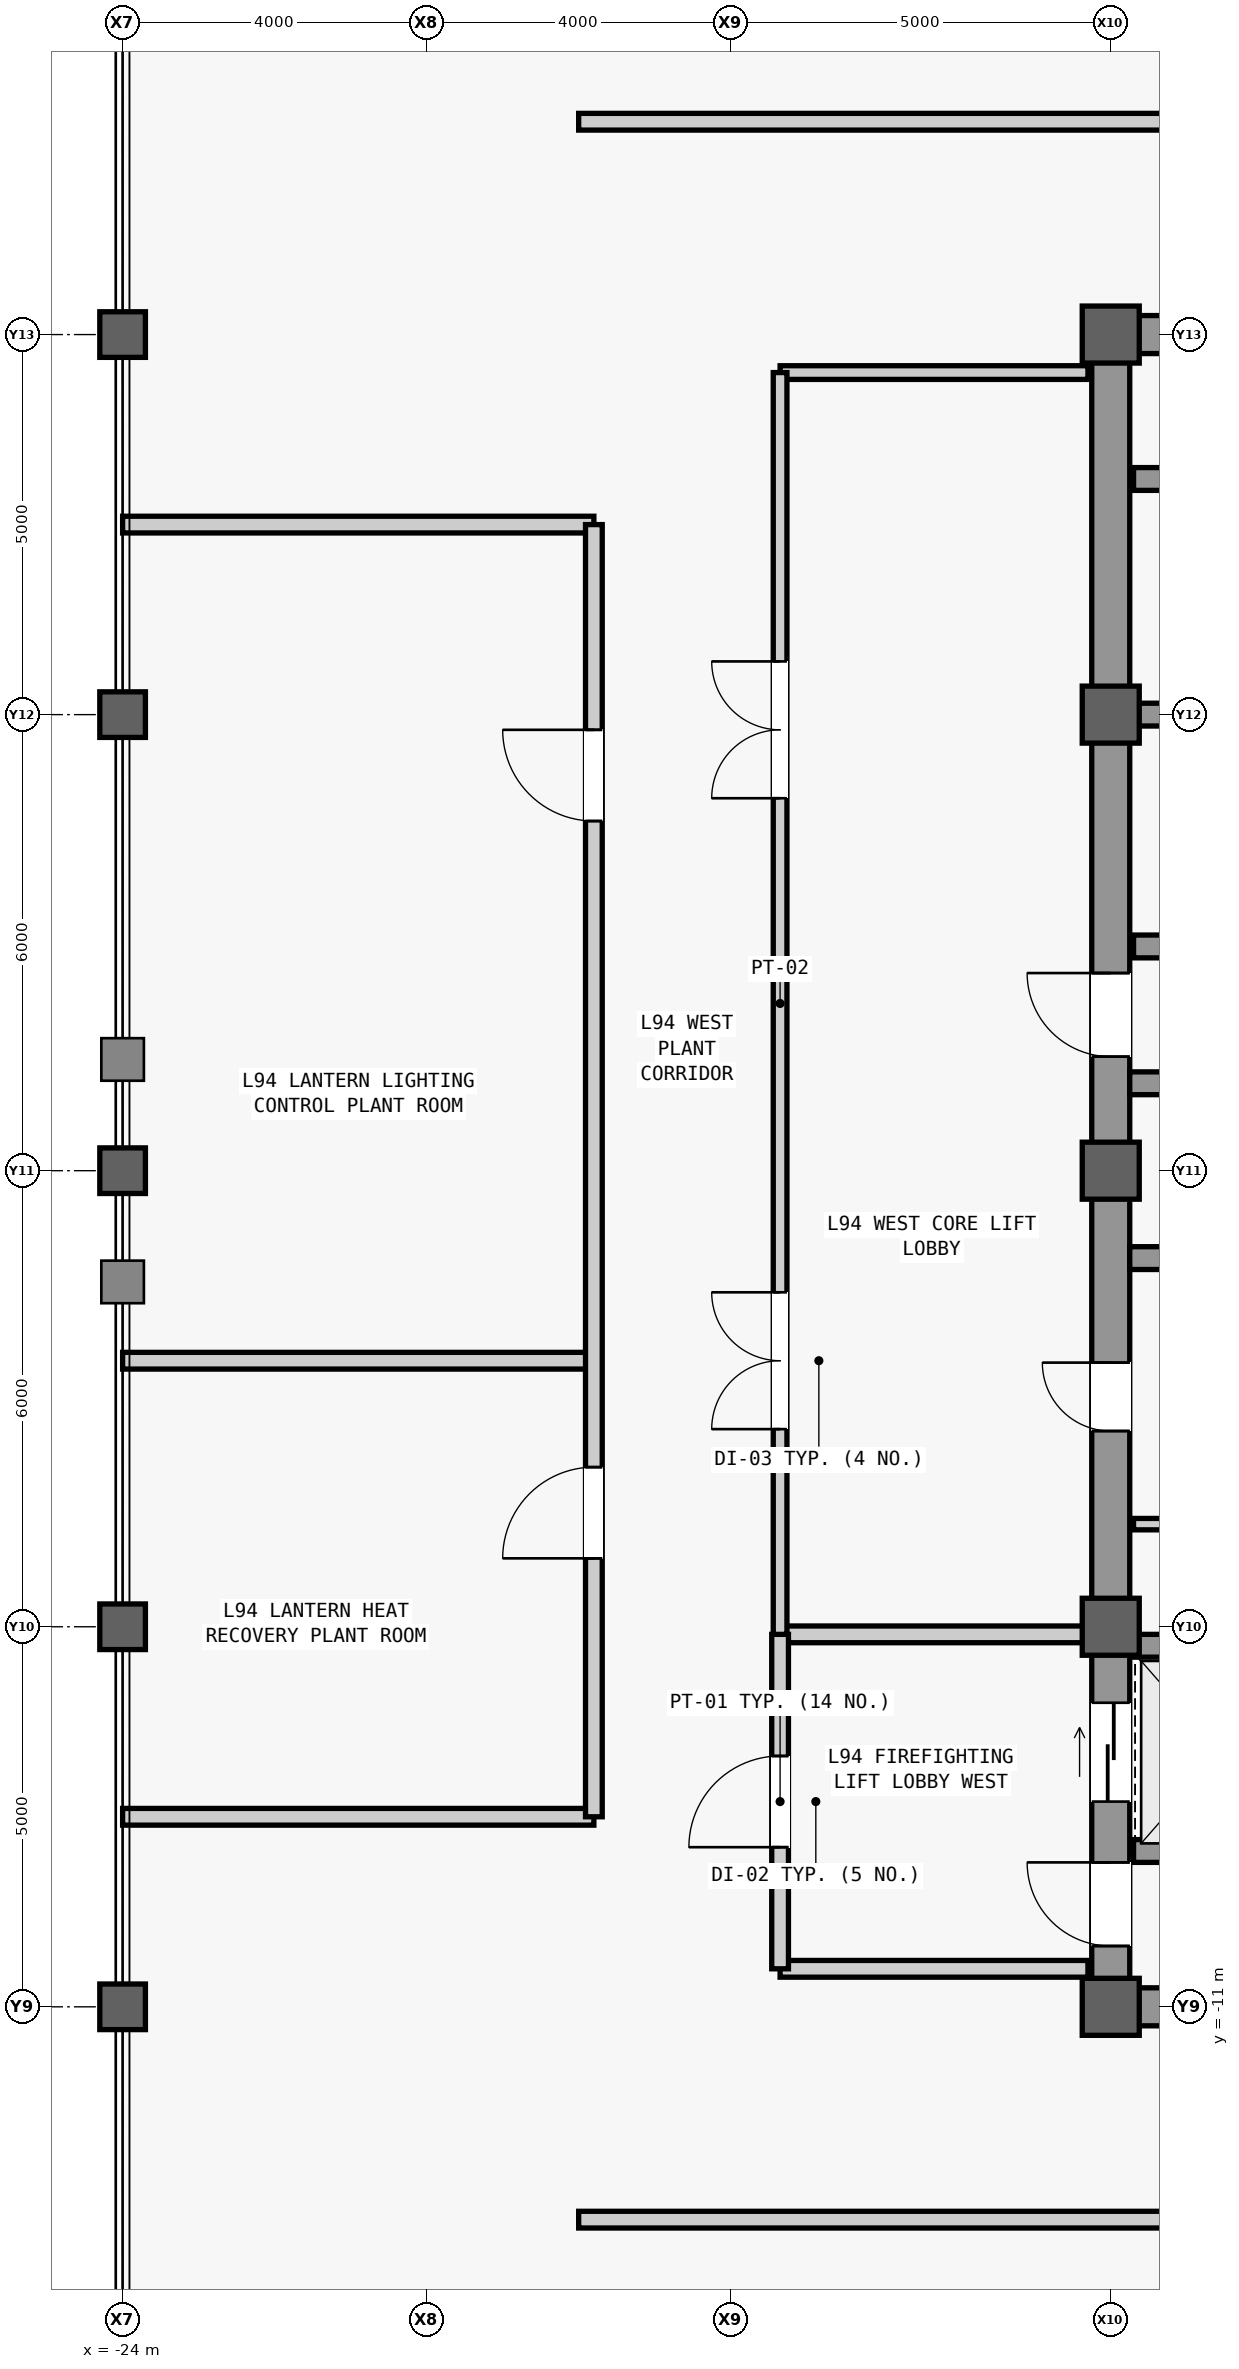
"""IFC4 building model, lengths in metres.
Left out: names, types, materials, properties, quantities, classifications, styles, units other than length and angle.
Written with IfcOpenShell. Run it as: python <this file> out.ifc"""

import sys

from ifc_helpers import new_model, si_unit, direction, frame, frame_2d, origin, origin_2d, place, context, subcontext, project, spatial, rectangle, hollow_rectangle, extrude, source, transform, mapped, element, fill, save


model = new_model("IFC4")
c1 = context("Model", 3, precision=1e-05, world=origin(), true_north=direction((0.0, 1.0)))
c2 = subcontext(c1, "Body", "Model", "MODEL_VIEW")
j1 = project(units=[si_unit("LENGTHUNIT", "METRE"), si_unit("PLANEANGLEUNIT", "RADIAN")], contexts=[c1])
p1 = place(None, origin())
s1 = spatial("IfcSite", under=j1, at=p1, CompositionType="ELEMENT")
p2 = place(p1, origin())
s2 = spatial("IfcBuilding", under=s1, at=p2, CompositionType="ELEMENT")
p3 = place(p2, frame((0.0, 0.0, 399.5)))
s3 = spatial("IfcBuildingStorey", under=s2, at=p3, CompositionType="ELEMENT", Elevation=399.5)
m1 = source(origin(), c2, "Body", "SweptSolid", [
    extrude(rectangle(XDim=22.0, YDim=0.5, at=frame_2d((11.0, 0.0))), origin(), (0.0, 0.0, 1.0), 4.5),
])
p4 = place(p3, frame((-11.0, -11.0, 0.0), z_axis=(0.0, 0.0, 1.0), x_axis=(0.0, 1.0, 0.0)))
e1 = element("IfcWall", 1, at=p4, inside=s3, PredefinedType="SHEAR", context=c2, shape_type="MappedRepresentation", body=[
    mapped(m1, transform((0.0, 0.0, 0.0), scale=1.0)),
])
m2 = source(origin(), c2, "Body", "SweptSolid", [
    extrude(rectangle(XDim=1.1, YDim=2.2, at=frame_2d((0.55, 1.1))), frame((0.0, 0.26, 0.0), z_axis=(0.0, -1.0, 0.0), x_axis=(1.0, 0.0, 0.0)), (0.0, 0.0, 1.0), 0.52),
])
p5 = place(p4, frame((0.8, 0.0, 0.0)))
e2 = element("IfcOpeningElement", 2, at=p5, cuts=e1, PredefinedType="OPENING", context=c2, shape_type="MappedRepresentation", body=[
    mapped(m2, transform((0.0, 0.0, 0.0), scale=1.0)),
])
p6 = place(p4, frame((12.5, 0.0, 0.0)))
e3 = element("IfcOpeningElement", 3, at=p6, cuts=e1, PredefinedType="OPENING", context=c2, shape_type="MappedRepresentation", body=[
    mapped(m2, transform((0.0, 0.0, 0.0), scale=1.0)),
])
m3 = source(origin(), c2, "Body", "SweptSolid", [
    extrude(rectangle(XDim=0.9, YDim=2.15, at=frame_2d((0.45, 1.075))), frame((0.0, 0.26, 0.0), z_axis=(0.0, -1.0, 0.0), x_axis=(1.0, 0.0, 0.0)), (0.0, 0.0, 1.0), 0.52),
])
p7 = place(p4, frame((7.575, 0.0, 0.0)))
e4 = element("IfcOpeningElement", 4, at=p7, cuts=e1, PredefinedType="OPENING", context=c2, shape_type="MappedRepresentation", body=[
    mapped(m3, transform((0.0, 0.0, 0.0), scale=1.0)),
])
m4 = source(origin(), c2, "Body", "SweptSolid", [
    extrude(rectangle(XDim=1.3, YDim=2.3, at=frame_2d((0.65, 1.15))), frame((0.0, 0.26, 0.0), z_axis=(0.0, -1.0, 0.0), x_axis=(1.0, 0.0, 0.0)), (0.0, 0.0, 1.0), 0.52),
])
p8 = place(p4, frame((2.7, 0.0, 0.0)))
e5 = element("IfcOpeningElement", 5, at=p8, cuts=e1, PredefinedType="OPENING", context=c2, shape_type="MappedRepresentation", body=[
    mapped(m4, transform((0.0, 0.0, 0.0), scale=1.0)),
])
m5 = source(origin(), c2, "Body", "SweptSolid", [
    extrude(rectangle(XDim=5.9, YDim=0.5, at=frame_2d((2.95, 0.0))), origin(), (0.0, 0.0, 1.0), 4.5),
])
for number, where, z_axis, x_axis in (
    (6, (-10.75, -11.0, 0.0), (0.0, 0.0, 1.0), (1.0, 0.0, 0.0)),
    (7, (-10.75, 11.0, 0.0), (0.0, 0.0, 1.0), (1.0, 0.0, 0.0)),
):
    element("IfcWall", number, at=place(p3, frame(where, z_axis=z_axis, x_axis=x_axis)), inside=s3, PredefinedType="SHEAR", context=c2, shape_type="MappedRepresentation", body=[
        mapped(m5, transform((0.0, 0.0, 0.0), scale=1.0)),
    ])
m6 = source(origin(), c2, "Body", "SweptSolid", [
    extrude(rectangle(XDim=5.65, YDim=0.3, at=frame_2d((2.825, 0.0))), origin(), (0.0, 0.0, 1.0), 4.5),
])
for number, where, z_axis, x_axis in (
    (8, (-10.75, -1.15, 0.0), (0.0, 0.0, 1.0), (1.0, 0.0, 0.0)),
    (9, (-10.75, 1.15, 0.0), (0.0, 0.0, 1.0), (1.0, 0.0, 0.0)),
):
    element("IfcWall", number, at=place(p3, frame(where, z_axis=z_axis, x_axis=x_axis)), inside=s3, PredefinedType="SHEAR", context=c2, shape_type="MappedRepresentation", body=[
        mapped(m6, transform((0.0, 0.0, 0.0), scale=1.0)),
    ])
m7 = source(origin(), c2, "Body", "SweptSolid", [
    extrude(hollow_rectangle(XDim=0.6, YDim=0.6, WallThickness=0.035, at=origin_2d()), origin(), (0.0, 0.0, 1.0), 4.8),
])
for number, where, z_axis, x_axis in (
    (10, (-24.0, -11.0, 0.0), (0.0, 0.0, 1.0), (1.0, 0.0, 0.0)),
    (11, (-24.0, -6.0, 0.0), (0.0, 0.0, 1.0), (1.0, 0.0, 0.0)),
    (12, (-24.0, 0.0, 0.0), (0.0, 0.0, 1.0), (1.0, 0.0, 0.0)),
    (13, (-24.0, 6.0, 0.0), (0.0, 0.0, 1.0), (1.0, 0.0, 0.0)),
    (14, (-24.0, 11.0, 0.0), (0.0, 0.0, 1.0), (1.0, 0.0, 0.0)),
):
    element("IfcColumn", number, at=place(p3, frame(where, z_axis=z_axis, x_axis=x_axis)), inside=s3, PredefinedType="COLUMN", context=c2, shape_type="MappedRepresentation", body=[
        mapped(m7, transform((0.0, 0.0, 0.0), scale=1.0)),
    ])
m8 = source(origin(), c2, "Body", "SweptSolid", [
    extrude(rectangle(XDim=0.75, YDim=0.75, at=origin_2d()), origin(), (0.0, 0.0, 1.0), 4.8),
])
for number, where, z_axis, x_axis in (
    (15, (-11.0, -11.0, 0.0), (0.0, 0.0, 1.0), (1.0, 0.0, 0.0)),
    (16, (-11.0, -6.0, 0.0), (0.0, 0.0, 1.0), (1.0, 0.0, 0.0)),
    (17, (-11.0, 0.0, 0.0), (0.0, 0.0, 1.0), (1.0, 0.0, 0.0)),
    (18, (-11.0, 6.0, 0.0), (0.0, 0.0, 1.0), (1.0, 0.0, 0.0)),
    (19, (-11.0, 11.0, 0.0), (0.0, 0.0, 1.0), (1.0, 0.0, 0.0)),
):
    element("IfcColumn", number, at=place(p3, frame(where, z_axis=z_axis, x_axis=x_axis)), inside=s3, PredefinedType="COLUMN", context=c2, shape_type="MappedRepresentation", body=[
        mapped(m8, transform((0.0, 0.0, 0.0), scale=1.0)),
    ])
m9 = source(origin(), c2, "Body", "SweptSolid", [
    extrude(rectangle(XDim=2.2, YDim=0.3, at=frame_2d((1.1, 0.0))), origin(), (0.0, 0.0, 1.0), 4.5),
])
for number, where, z_axis, x_axis in (
    (20, (-10.7, -8.95, 0.0), (0.0, 0.0, 1.0), (1.0, 0.0, 0.0)),
    (21, (-10.7, -6.25, 0.0), (0.0, 0.0, 1.0), (1.0, 0.0, 0.0)),
    (22, (-10.7, 2.95, 0.0), (0.0, 0.0, 1.0), (1.0, 0.0, 0.0)),
    (23, (-10.7, 6.0, 0.0), (0.0, 0.0, 1.0), (1.0, 0.0, 0.0)),
    (24, (-10.7, 9.1, 0.0), (0.0, 0.0, 1.0), (1.0, 0.0, 0.0)),
):
    element("IfcWall", number, at=place(p3, frame(where, z_axis=z_axis, x_axis=x_axis)), inside=s3, PredefinedType="SHEAR", context=c2, shape_type="MappedRepresentation", body=[
        mapped(m9, transform((0.0, 0.0, 0.0), scale=1.0)),
    ])
m10 = source(origin(), c2, "Body", "SweptSolid", [
    extrude(rectangle(XDim=2.05, YDim=0.15, at=frame_2d((1.025, 0.0))), origin(), (0.0, 0.0, 1.0), 4.5),
])
p9 = place(p3, frame((-10.7, -4.65, 0.0), z_axis=(0.0, 0.0, 1.0), x_axis=(1.0, 0.0, 0.0)))
e25 = element("IfcWall", 25, at=p9, inside=s3, PredefinedType="PARTITIONING", context=c2, shape_type="MappedRepresentation", body=[
    mapped(m10, transform((0.0, 0.0, 0.0), scale=1.0)),
])
m11 = source(origin(), c2, "Body", "SweptSolid", [
    extrude(rectangle(XDim=4.05, YDim=0.22, at=frame_2d((2.025, 0.0))), origin(), (0.0, 0.0, 1.0), 4.5),
])
p10 = place(p3, frame((-15.35, -10.5, 0.0), z_axis=(0.0, 0.0, 1.0), x_axis=(1.0, 0.0, 0.0)))
e26 = element("IfcWall", 26, at=p10, inside=s3, PredefinedType="PARTITIONING", context=c2, shape_type="MappedRepresentation", body=[
    mapped(m11, transform((0.0, 0.0, 0.0), scale=1.0)),
])
m12 = source(origin(), c2, "Body", "SweptSolid", [
    extrude(rectangle(XDim=4.05, YDim=0.22, at=frame_2d((2.025, 0.0))), origin(), (0.0, 0.0, 1.0), 3.951),
])
p11 = place(p3, frame((-15.35, -6.1, 0.0), z_axis=(0.0, 0.0, 1.0), x_axis=(1.0, 0.0, 0.0)))
e27 = element("IfcWall", 27, at=p11, inside=s3, PredefinedType="PARTITIONING", context=c2, shape_type="MappedRepresentation", body=[
    mapped(m12, transform((0.0, 0.0, 0.0), scale=1.0)),
])
m13 = source(origin(), c2, "Body", "SweptSolid", [
    extrude(rectangle(XDim=4.4, YDim=0.22, at=frame_2d((2.2, 0.0))), origin(), (0.0, 0.0, 1.0), 4.5),
])
p12 = place(p3, frame((-15.35, -10.5, 0.0), z_axis=(0.0, 0.0, 1.0), x_axis=(0.0, 1.0, 0.0)))
e28 = element("IfcWall", 28, at=p12, inside=s3, PredefinedType="PARTITIONING", context=c2, shape_type="MappedRepresentation", body=[
    mapped(m13, transform((0.0, 0.0, 0.0), scale=1.0)),
])
m14 = source(origin(), c2, "Body", "SweptSolid", [
    extrude(rectangle(XDim=1.2, YDim=2.2, at=frame_2d((0.6, 1.1))), frame((0.0, 0.12, 0.0), z_axis=(0.0, -1.0, 0.0), x_axis=(1.0, 0.0, 0.0)), (0.0, 0.0, 1.0), 0.24),
])
p13 = place(p12, frame((1.6, 0.0, 0.0)))
e29 = element("IfcOpeningElement", 29, at=p13, cuts=e28, PredefinedType="OPENING", context=c2, shape_type="MappedRepresentation", body=[
    mapped(m14, transform((0.0, 0.0, 0.0), scale=1.0)),
])
m15 = source(origin(), c2, "Body", "SweptSolid", [
    extrude(rectangle(XDim=4.05, YDim=0.18, at=frame_2d((2.025, 0.0))), origin(), (0.0, 0.0, 1.0), 4.5),
])
p14 = place(p3, frame((-15.35, 10.5, 0.0), z_axis=(0.0, 0.0, 1.0), x_axis=(1.0, 0.0, 0.0)))
e30 = element("IfcWall", 30, at=p14, inside=s3, PredefinedType="PARTITIONING", context=c2, shape_type="MappedRepresentation", body=[
    mapped(m15, transform((0.0, 0.0, 0.0), scale=1.0)),
])
m16 = source(origin(), c2, "Body", "SweptSolid", [
    extrude(rectangle(XDim=16.6, YDim=0.18, at=frame_2d((8.3, 0.0))), origin(), (0.0, 0.0, 1.0), 4.5),
])
p15 = place(p3, frame((-15.35, -6.1, 0.0), z_axis=(0.0, 0.0, 1.0), x_axis=(0.0, 1.0, 0.0)))
e31 = element("IfcWall", 31, at=p15, inside=s3, PredefinedType="PARTITIONING", context=c2, shape_type="MappedRepresentation", body=[
    mapped(m16, transform((0.0, 0.0, 0.0), scale=1.0)),
])
m17 = source(origin(), c2, "Body", "SweptSolid", [
    extrude(rectangle(XDim=1.8, YDim=2.25, at=frame_2d((0.9, 1.125))), frame((0.0, 0.1, 0.0), z_axis=(0.0, -1.0, 0.0), x_axis=(1.0, 0.0, 0.0)), (0.0, 0.0, 1.0), 0.2),
])
p16 = place(p15, frame((2.7, 0.0, 0.0)))
e32 = element("IfcOpeningElement", 32, at=p16, cuts=e31, PredefinedType="OPENING", context=c2, shape_type="MappedRepresentation", body=[
    mapped(m17, transform((0.0, 0.0, 0.0), scale=1.0)),
])
p17 = place(p15, frame((11.0, 0.0, 0.0)))
e33 = element("IfcOpeningElement", 33, at=p17, cuts=e31, PredefinedType="OPENING", context=c2, shape_type="MappedRepresentation", body=[
    mapped(m17, transform((0.0, 0.0, 0.0), scale=1.0)),
])
m18 = source(origin(), c2, "Body", "SweptSolid", [
    extrude(rectangle(XDim=36.0, YDim=0.22, at=frame_2d((18.0, 0.0))), origin(), (0.0, 0.0, 1.0), 4.5),
])
p18 = place(p3, frame((-18.0, -13.8, 0.0), z_axis=(0.0, 0.0, 1.0), x_axis=(1.0, 0.0, 0.0)))
e34 = element("IfcWall", 34, at=p18, inside=s3, PredefinedType="PARTITIONING", context=c2, shape_type="MappedRepresentation", body=[
    mapped(m18, transform((0.0, 0.0, 0.0), scale=1.0)),
])
m19 = source(origin(), c2, "Body", "SweptSolid", [
    extrude(rectangle(XDim=1.5, YDim=2.3, at=frame_2d((0.75, 1.15))), frame((0.0, 0.12, 0.0), z_axis=(0.0, -1.0, 0.0), x_axis=(1.0, 0.0, 0.0)), (0.0, 0.0, 1.0), 0.24),
])
p19 = place(p18, frame((12.4, 0.0, 0.0)))
e35 = element("IfcOpeningElement", 35, at=p19, cuts=e34, PredefinedType="OPENING", context=c2, shape_type="MappedRepresentation", body=[
    mapped(m19, transform((0.0, 0.0, 0.0), scale=1.0)),
])
p20 = place(p18, frame((25.4, 0.0, 0.0)))
e36 = element("IfcOpeningElement", 36, at=p20, cuts=e34, PredefinedType="OPENING", context=c2, shape_type="MappedRepresentation", body=[
    mapped(m19, transform((0.0, 0.0, 0.0), scale=1.0)),
])
p21 = place(p3, frame((-18.0, 13.8, 0.0), z_axis=(0.0, 0.0, 1.0), x_axis=(1.0, 0.0, 0.0)))
e37 = element("IfcWall", 37, at=p21, inside=s3, PredefinedType="PARTITIONING", context=c2, shape_type="MappedRepresentation", body=[
    mapped(m18, transform((0.0, 0.0, 0.0), scale=1.0)),
])
p22 = place(p21, frame((9.45, 0.0, 0.0)))
e38 = element("IfcOpeningElement", 38, at=p22, cuts=e37, PredefinedType="OPENING", context=c2, shape_type="MappedRepresentation", body=[
    mapped(m19, transform((0.0, 0.0, 0.0), scale=1.0)),
])
p23 = place(p21, frame((19.15, 0.0, 0.0)))
e39 = element("IfcOpeningElement", 39, at=p23, cuts=e37, PredefinedType="OPENING", context=c2, shape_type="MappedRepresentation", body=[
    mapped(m19, transform((0.0, 0.0, 0.0), scale=1.0)),
])
p24 = place(p21, frame((27.6, 0.0, 0.0)))
e40 = element("IfcOpeningElement", 40, at=p24, cuts=e37, PredefinedType="OPENING", context=c2, shape_type="MappedRepresentation", body=[
    mapped(m19, transform((0.0, 0.0, 0.0), scale=1.0)),
])
m20 = source(origin(), c2, "Body", "SweptSolid", [
    extrude(rectangle(XDim=6.2, YDim=0.22, at=frame_2d((3.1, 0.0))), origin(), (0.0, 0.0, 1.0), 4.5),
])
for number, where, z_axis, x_axis in (
    (41, (-24.0, -2.5, 0.0), (0.0, 0.0, 1.0), (1.0, 0.0, 0.0)),
    (42, (-24.0, -8.5, 0.0), (0.0, 0.0, 1.0), (1.0, 0.0, 0.0)),
    (43, (-24.0, 8.5, 0.0), (0.0, 0.0, 1.0), (1.0, 0.0, 0.0)),
):
    element("IfcWall", number, at=place(p3, frame(where, z_axis=z_axis, x_axis=x_axis)), inside=s3, PredefinedType="PARTITIONING", context=c2, shape_type="MappedRepresentation", body=[
        mapped(m20, transform((0.0, 0.0, 0.0), scale=1.0)),
    ])
m21 = source(origin(), c2, "Body", "SweptSolid", [
    extrude(rectangle(XDim=17.0, YDim=0.22, at=frame_2d((8.5, 0.0))), origin(), (0.0, 0.0, 1.0), 4.5),
])
p25 = place(p3, frame((-17.8, -8.5, 0.0), z_axis=(0.0, 0.0, 1.0), x_axis=(0.0, 1.0, 0.0)))
e44 = element("IfcWall", 44, at=p25, inside=s3, PredefinedType="PARTITIONING", context=c2, shape_type="MappedRepresentation", body=[
    mapped(m21, transform((0.0, 0.0, 0.0), scale=1.0)),
])
p26 = place(p25, frame((3.4, 0.0, 0.0)))
e45 = element("IfcOpeningElement", 45, at=p26, cuts=e44, PredefinedType="OPENING", context=c2, shape_type="MappedRepresentation", body=[
    mapped(m14, transform((0.0, 0.0, 0.0), scale=1.0)),
])
p27 = place(p25, frame((13.1, 0.0, 0.0)))
e46 = element("IfcOpeningElement", 46, at=p27, cuts=e44, PredefinedType="OPENING", context=c2, shape_type="MappedRepresentation", body=[
    mapped(m14, transform((0.0, 0.0, 0.0), scale=1.0)),
])
m22 = source(origin(), c2, "Body", "SweptSolid", [
    extrude(rectangle(XDim=1.1, YDim=2.2, at=frame_2d((0.55, 1.1))), frame((0.0, 0.025, 0.0), z_axis=(0.0, -1.0, 0.0), x_axis=(1.0, 0.0, 0.0)), (0.0, 0.0, 1.0), 0.05),
])
p28 = place(p5, origin())
e47 = element("IfcDoor", 47, at=p28, inside=s3, OperationType="SINGLE_SWING_RIGHT", PredefinedType="DOOR", context=c2, shape_type="MappedRepresentation", body=[
    mapped(m22, transform((0.0, 0.0, 0.0), scale=1.0)),
])
fill(e2, e47)
p29 = place(p6, origin())
e48 = element("IfcDoor", 48, at=p29, inside=s3, OperationType="SINGLE_SWING_RIGHT", PredefinedType="DOOR", context=c2, shape_type="MappedRepresentation", body=[
    mapped(m22, transform((0.0, 0.0, 0.0), scale=1.0)),
])
fill(e3, e48)
m23 = source(origin(), c2, "Body", "SweptSolid", [
    extrude(rectangle(XDim=0.9, YDim=2.15, at=frame_2d((0.45, 1.075))), frame((0.0, 0.025, 0.0), z_axis=(0.0, -1.0, 0.0), x_axis=(1.0, 0.0, 0.0)), (0.0, 0.0, 1.0), 0.05),
])
p30 = place(p7, origin())
e49 = element("IfcDoor", 49, at=p30, inside=s3, OperationType="SINGLE_SWING_RIGHT", PredefinedType="DOOR", context=c2, shape_type="MappedRepresentation", body=[
    mapped(m23, transform((0.0, 0.0, 0.0), scale=1.0)),
])
fill(e4, e49)
m24 = source(origin(), c2, "Body", "SweptSolid", [
    extrude(rectangle(XDim=1.2, YDim=2.2, at=frame_2d((0.6, 1.1))), frame((0.0, 0.025, 0.0), z_axis=(0.0, -1.0, 0.0), x_axis=(1.0, 0.0, 0.0)), (0.0, 0.0, 1.0), 0.05),
])
p31 = place(p13, origin())
e50 = element("IfcDoor", 50, at=p31, inside=s3, OperationType="SINGLE_SWING_LEFT", PredefinedType="DOOR", context=c2, shape_type="MappedRepresentation", body=[
    mapped(m24, transform((0.0, 0.0, 0.0), scale=1.0)),
])
fill(e29, e50)
m25 = source(origin(), c2, "Body", "SweptSolid", [
    extrude(rectangle(XDim=1.8, YDim=2.25, at=frame_2d((0.9, 1.125))), frame((0.0, 0.025, 0.0), z_axis=(0.0, -1.0, 0.0), x_axis=(1.0, 0.0, 0.0)), (0.0, 0.0, 1.0), 0.05),
])
p32 = place(p16, origin())
e51 = element("IfcDoor", 51, at=p32, inside=s3, OperationType="SINGLE_SWING_LEFT", PredefinedType="DOOR", context=c2, shape_type="MappedRepresentation", body=[
    mapped(m25, transform((0.0, 0.0, 0.0), scale=1.0)),
])
fill(e32, e51)
p33 = place(p17, origin())
e52 = element("IfcDoor", 52, at=p33, inside=s3, OperationType="SINGLE_SWING_RIGHT", PredefinedType="DOOR", context=c2, shape_type="MappedRepresentation", body=[
    mapped(m25, transform((0.0, 0.0, 0.0), scale=1.0)),
])
fill(e33, e52)
p34 = place(p26, origin())
e53 = element("IfcDoor", 53, at=p34, inside=s3, OperationType="SINGLE_SWING_LEFT", PredefinedType="DOOR", context=c2, shape_type="MappedRepresentation", body=[
    mapped(m24, transform((0.0, 0.0, 0.0), scale=1.0)),
])
fill(e45, e53)
p35 = place(p27, origin())
e54 = element("IfcDoor", 54, at=p35, inside=s3, OperationType="SINGLE_SWING_RIGHT", PredefinedType="DOOR", context=c2, shape_type="MappedRepresentation", body=[
    mapped(m24, transform((0.0, 0.0, 0.0), scale=1.0)),
])
fill(e46, e54)
m26 = source(origin(), c2, "Body", "SweptSolid", [
    extrude(rectangle(XDim=1.3, YDim=2.3, at=frame_2d((0.65, 1.15))), frame((0.0, 0.025, 0.0), z_axis=(0.0, -1.0, 0.0), x_axis=(1.0, 0.0, 0.0)), (0.0, 0.0, 1.0), 0.05),
])
p36 = place(p8, origin())
e55 = element("IfcDoor", 55, at=p36, inside=s3, OperationType="SLIDING_TO_LEFT", PredefinedType="DOOR", context=c2, shape_type="MappedRepresentation", body=[
    mapped(m26, transform((0.0, 0.0, 0.0), scale=1.0)),
])
fill(e5, e55)
save(model, sys.argv[1])
